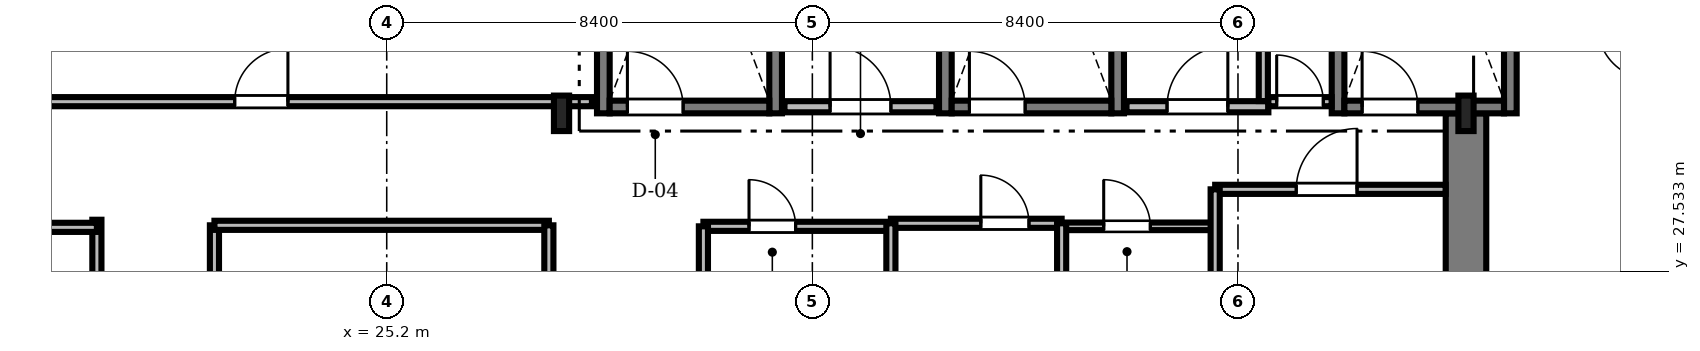
"""IFC4 building model, lengths in metres.
Left out: names, types, materials, properties, quantities, classifications, styles, units other than length and angle.
Written with IfcOpenShell. Run it as: python <this file> out.ifc"""

import sys

from ifc_helpers import new_model, si_unit, direction, frame, frame_2d, origin, origin_2d, place, context, subcontext, project, spatial, rectangle, i_section, extrude, source, transform, mapped, element, fill, save


model = new_model("IFC4")
c1 = context("Model", 3, precision=1e-05, world=origin(), true_north=direction((0.0, 1.0)))
c2 = subcontext(c1, "Body", "Model", "MODEL_VIEW")
j1 = project(units=[si_unit("LENGTHUNIT", "METRE"), si_unit("PLANEANGLEUNIT", "RADIAN")], contexts=[c1])
p1 = place(None, origin())
s1 = spatial("IfcSite", under=j1, at=p1, CompositionType="ELEMENT")
p2 = place(p1, origin())
s2 = spatial("IfcBuilding", under=s1, at=p2, CompositionType="ELEMENT")
p3 = place(p2, frame((0.0, 0.0, 196.05)))
s3 = spatial("IfcBuildingStorey", under=s2, at=p3, CompositionType="ELEMENT", Elevation=196.05)
m1 = source(origin(), c2, "Body", "SweptSolid", [
    extrude(rectangle(XDim=13.15, YDim=0.8, at=frame_2d((6.575, 0.0))), origin(), (0.0, 0.0, 1.0), 3.53),
])
p4 = place(p3, frame((46.5, 17.5, 0.0), z_axis=(0.0, 0.0, 1.0), x_axis=(0.0, 1.0, 0.0)))
e1 = element("IfcWall", 1, at=p4, inside=s3, PredefinedType="SHEAR", context=c2, shape_type="MappedRepresentation", body=[
    mapped(m1, transform((0.0, 0.0, 0.0), scale=1.0)),
])
m2 = source(origin(), c2, "Body", "SweptSolid", [
    extrude(i_section(OverallWidth=0.3, OverallDepth=0.7, WebThickness=0.017, FlangeThickness=0.032, FilletRadius=0.027, at=origin_2d()), origin(), (0.0, 0.0, 1.0), 3.53),
])
for number, where, z_axis, x_axis in (
    (2, (28.65, 30.65, 0.0), (0.0, 0.0, 1.0), (1.0, 0.0, 0.0)),
    (3, (46.5, 30.65, 0.0), (0.0, 0.0, 1.0), (1.0, 0.0, 0.0)),
):
    element("IfcColumn", number, at=place(p3, frame(where, z_axis=z_axis, x_axis=x_axis)), inside=s3, PredefinedType="COLUMN", context=c2, shape_type="MappedRepresentation", body=[
        mapped(m2, transform((0.0, 0.0, 0.0), scale=1.0)),
    ])
m3 = source(origin(), c2, "Body", "SweptSolid", [
    extrude(rectangle(XDim=9.25, YDim=0.25, at=frame_2d((4.625, 0.0))), origin(), (0.0, 0.0, 1.0), 3.55),
])
for number, where, z_axis, x_axis in (
    (4, (29.475, 30.65, 0.0), (0.0, 0.0, 1.0), (0.0, 1.0, 0.0)),
    (5, (32.875, 30.65, 0.0), (0.0, 0.0, 1.0), (0.0, 1.0, 0.0)),
):
    element("IfcWall", number, at=place(p3, frame(where, z_axis=z_axis, x_axis=x_axis)), inside=s3, PredefinedType="SOLIDWALL", context=c2, shape_type="MappedRepresentation", body=[
        mapped(m3, transform((0.0, 0.0, 0.0), scale=1.0)),
    ])
m4 = source(origin(), c2, "Body", "SweptSolid", [
    extrude(rectangle(XDim=3.15, YDim=0.25, at=frame_2d((1.575, 0.0))), origin(), (0.0, 0.0, 1.0), 3.55),
])
p5 = place(p3, frame((29.6, 30.775, 0.0), z_axis=(0.0, 0.0, 1.0), x_axis=(1.0, 0.0, 0.0)))
e6 = element("IfcWall", 6, at=p5, inside=s3, PredefinedType="SOLIDWALL", context=c2, shape_type="MappedRepresentation", body=[
    mapped(m4, transform((0.0, 0.0, 0.0), scale=1.0)),
])
m5 = source(origin(), c2, "Body", "SweptSolid", [
    extrude(rectangle(XDim=1.1, YDim=2.2, at=frame_2d((0.55, 1.1))), frame((0.0, 0.135, 0.0), z_axis=(0.0, -1.0, 0.0), x_axis=(1.0, 0.0, 0.0)), (0.0, 0.0, 1.0), 0.27),
])
p6 = place(p5, frame((0.35, 0.0, 0.0)))
e7 = element("IfcOpeningElement", 7, at=p6, cuts=e6, PredefinedType="OPENING", context=c2, shape_type="MappedRepresentation", body=[
    mapped(m5, transform((0.0, 0.0, 0.0), scale=1.0)),
])
for number, where, z_axis, x_axis in (
    (8, (36.225, 30.65, 0.0), (0.0, 0.0, 1.0), (0.0, 1.0, 0.0)),
    (9, (39.625, 30.65, 0.0), (0.0, 0.0, 1.0), (0.0, 1.0, 0.0)),
):
    element("IfcWall", number, at=place(p3, frame(where, z_axis=z_axis, x_axis=x_axis)), inside=s3, PredefinedType="SOLIDWALL", context=c2, shape_type="MappedRepresentation", body=[
        mapped(m3, transform((0.0, 0.0, 0.0), scale=1.0)),
    ])
p7 = place(p3, frame((36.35, 30.775, 0.0), z_axis=(0.0, 0.0, 1.0), x_axis=(1.0, 0.0, 0.0)))
e10 = element("IfcWall", 10, at=p7, inside=s3, PredefinedType="SOLIDWALL", context=c2, shape_type="MappedRepresentation", body=[
    mapped(m4, transform((0.0, 0.0, 0.0), scale=1.0)),
])
p8 = place(p7, frame((0.35, 0.0, 0.0)))
e11 = element("IfcOpeningElement", 11, at=p8, cuts=e10, PredefinedType="OPENING", context=c2, shape_type="MappedRepresentation", body=[
    mapped(m5, transform((0.0, 0.0, 0.0), scale=1.0)),
])
for number, where, z_axis, x_axis in (
    (12, (43.975, 30.65, 0.0), (0.0, 0.0, 1.0), (0.0, 1.0, 0.0)),
    (13, (47.375, 30.65, 0.0), (0.0, 0.0, 1.0), (0.0, 1.0, 0.0)),
):
    element("IfcWall", number, at=place(p3, frame(where, z_axis=z_axis, x_axis=x_axis)), inside=s3, PredefinedType="SOLIDWALL", context=c2, shape_type="MappedRepresentation", body=[
        mapped(m3, transform((0.0, 0.0, 0.0), scale=1.0)),
    ])
p9 = place(p3, frame((44.1, 30.775, 0.0), z_axis=(0.0, 0.0, 1.0), x_axis=(1.0, 0.0, 0.0)))
e14 = element("IfcWall", 14, at=p9, inside=s3, PredefinedType="SOLIDWALL", context=c2, shape_type="MappedRepresentation", body=[
    mapped(m4, transform((0.0, 0.0, 0.0), scale=1.0)),
])
p10 = place(p9, frame((0.35, 0.0, 0.0)))
e15 = element("IfcOpeningElement", 15, at=p10, cuts=e14, PredefinedType="OPENING", context=c2, shape_type="MappedRepresentation", body=[
    mapped(m5, transform((0.0, 0.0, 0.0), scale=1.0)),
])
m6 = source(origin(), c2, "Body", "SweptSolid", [
    extrude(rectangle(XDim=3.0, YDim=0.22, at=frame_2d((1.5, 0.0))), origin(), (0.0, 0.0, 1.0), 3.53),
])
p11 = place(p3, frame((33.05, 30.78, 0.0), z_axis=(0.0, 0.0, 1.0), x_axis=(1.0, 0.0, 0.0)))
e16 = element("IfcWall", 16, at=p11, inside=s3, PredefinedType="SOLIDWALL", context=c2, shape_type="MappedRepresentation", body=[
    mapped(m6, transform((0.0, 0.0, 0.0), scale=1.0)),
])
m7 = source(origin(), c2, "Body", "SweptSolid", [
    extrude(rectangle(XDim=1.2, YDim=2.2, at=frame_2d((0.6, 1.1))), frame((0.0, 0.12, 0.0), z_axis=(0.0, -1.0, 0.0), x_axis=(1.0, 0.0, 0.0)), (0.0, 0.0, 1.0), 0.24),
])
p12 = place(p11, frame((0.9, 0.0, 0.0)))
e17 = element("IfcOpeningElement", 17, at=p12, cuts=e16, PredefinedType="OPENING", context=c2, shape_type="MappedRepresentation", body=[
    mapped(m7, transform((0.0, 0.0, 0.0), scale=1.0)),
])
m8 = source(origin(), c2, "Body", "SweptSolid", [
    extrude(rectangle(XDim=2.8, YDim=0.22, at=frame_2d((1.4, 0.0))), origin(), (0.0, 0.0, 1.0), 3.53),
])
p13 = place(p3, frame((39.8, 30.78, 0.0), z_axis=(0.0, 0.0, 1.0), x_axis=(1.0, 0.0, 0.0)))
e18 = element("IfcWall", 18, at=p13, inside=s3, PredefinedType="SOLIDWALL", context=c2, shape_type="MappedRepresentation", body=[
    mapped(m8, transform((0.0, 0.0, 0.0), scale=1.0)),
])
p14 = place(p13, frame((0.8, 0.0, 0.0)))
e19 = element("IfcOpeningElement", 19, at=p14, cuts=e18, PredefinedType="OPENING", context=c2, shape_type="MappedRepresentation", body=[
    mapped(m7, transform((0.0, 0.0, 0.0), scale=1.0)),
])
m9 = source(origin(), c2, "Body", "SweptSolid", [
    extrude(rectangle(XDim=17.828, YDim=0.18, at=frame_2d((8.914, 0.0))), origin(), (0.0, 0.0, 1.0), 2.772),
])
p15 = place(p3, frame((11.422, 30.88, 0.0), z_axis=(0.0, 0.0, 1.0), x_axis=(1.0, 0.0, 0.0)))
e20 = element("IfcWall", 20, at=p15, inside=s3, PredefinedType="PARTITIONING", context=c2, shape_type="MappedRepresentation", body=[
    mapped(m9, transform((0.0, 0.0, 0.0), scale=1.0)),
])
m10 = source(origin(), c2, "Body", "SweptSolid", [
    extrude(rectangle(XDim=1.05, YDim=2.2, at=frame_2d((0.525, 1.1))), frame((0.0, 0.1, 0.0), z_axis=(0.0, -1.0, 0.0), x_axis=(1.0, 0.0, 0.0)), (0.0, 0.0, 1.0), 0.2),
])
p16 = place(p15, frame((10.778, 0.0, 0.0)))
e21 = element("IfcOpeningElement", 21, at=p16, cuts=e20, PredefinedType="OPENING", context=c2, shape_type="MappedRepresentation", body=[
    mapped(m10, transform((0.0, 0.0, 0.0), scale=1.0)),
])
m11 = source(origin(), c2, "Body", "SweptSolid", [
    extrude(rectangle(XDim=14.92, YDim=0.18, at=frame_2d((7.46, 0.0))), origin(), (0.0, 0.0, 1.0), 2.972),
])
p17 = place(p3, frame((19.48, 13.63, 0.0), z_axis=(0.0, 0.0, 1.0), x_axis=(0.0, 1.0, 0.0)))
e22 = element("IfcWall", 22, at=p17, inside=s3, PredefinedType="PARTITIONING", context=c2, shape_type="MappedRepresentation", body=[
    mapped(m11, transform((0.0, 0.0, 0.0), scale=1.0)),
])
p18 = place(p17, frame((1.942, 0.0, 0.0)))
e23 = element("IfcOpeningElement", 23, at=p18, cuts=e22, PredefinedType="OPENING", context=c2, shape_type="MappedRepresentation", body=[
    mapped(m10, transform((0.0, 0.0, 0.0), scale=1.0)),
])
m12 = source(origin(), c2, "Body", "SweptSolid", [
    extrude(rectangle(XDim=0.95, YDim=2.15, at=frame_2d((0.475, 1.075))), frame((0.0, 0.1, 0.0), z_axis=(0.0, -1.0, 0.0), x_axis=(1.0, 0.0, 0.0)), (0.0, 0.0, 1.0), 0.2),
])
p19 = place(p17, frame((8.09, 0.0, 0.0)))
e24 = element("IfcOpeningElement", 24, at=p19, cuts=e22, PredefinedType="OPENING", context=c2, shape_type="MappedRepresentation", body=[
    mapped(m12, transform((0.0, 0.0, 0.0), scale=1.0)),
])
p20 = place(p17, frame((11.788, 0.0, 0.0)))
e25 = element("IfcOpeningElement", 25, at=p20, cuts=e22, PredefinedType="OPENING", context=c2, shape_type="MappedRepresentation", body=[
    mapped(m10, transform((0.0, 0.0, 0.0), scale=1.0)),
])
m13 = source(origin(), c2, "Body", "SweptSolid", [
    extrude(rectangle(XDim=4.548, YDim=0.18, at=frame_2d((2.274, 0.0))), origin(), (0.0, 0.0, 1.0), 3.162),
])
p21 = place(p3, frame((41.55, 29.15, 0.0), z_axis=(0.0, 0.0, 1.0), x_axis=(1.0, 0.0, 0.0)))
e26 = element("IfcWall", 26, at=p21, inside=s3, PredefinedType="PARTITIONING", context=c2, shape_type="MappedRepresentation", body=[
    mapped(m13, transform((0.0, 0.0, 0.0), scale=1.0)),
])
m14 = source(origin(), c2, "Body", "SweptSolid", [
    extrude(rectangle(XDim=1.2, YDim=2.2, at=frame_2d((0.6, 1.1))), frame((0.0, 0.1, 0.0), z_axis=(0.0, -1.0, 0.0), x_axis=(1.0, 0.0, 0.0)), (0.0, 0.0, 1.0), 0.2),
])
p22 = place(p21, frame((1.6, 0.0, 0.0)))
e27 = element("IfcOpeningElement", 27, at=p22, cuts=e26, PredefinedType="OPENING", context=c2, shape_type="MappedRepresentation", body=[
    mapped(m14, transform((0.0, 0.0, 0.0), scale=1.0)),
])
m15 = source(origin(), c2, "Body", "SweptSolid", [
    extrude(rectangle(XDim=4.24, YDim=0.18, at=frame_2d((2.12, 0.0))), origin(), (0.0, 0.0, 1.0), 2.972),
])
p23 = place(p3, frame((21.8, 24.2, 0.0), z_axis=(0.0, 0.0, 1.0), x_axis=(0.0, 1.0, 0.0)))
e28 = element("IfcWall", 28, at=p23, inside=s3, PredefinedType="PARTITIONING", context=c2, shape_type="MappedRepresentation", body=[
    mapped(m15, transform((0.0, 0.0, 0.0), scale=1.0)),
])
p24 = place(p23, frame((1.4, 0.0, 0.0)))
e29 = element("IfcOpeningElement", 29, at=p24, cuts=e28, PredefinedType="OPENING", context=c2, shape_type="MappedRepresentation", body=[
    mapped(m10, transform((0.0, 0.0, 0.0), scale=1.0)),
])
m16 = source(origin(), c2, "Body", "SweptSolid", [
    extrude(rectangle(XDim=3.7, YDim=0.18, at=frame_2d((1.85, 0.0))), origin(), (0.0, 0.0, 1.0), 3.162),
])
p25 = place(p3, frame((31.45, 28.42, 0.0), z_axis=(0.0, 0.0, 1.0), x_axis=(1.0, 0.0, 0.0)))
e30 = element("IfcWall", 30, at=p25, inside=s3, PredefinedType="PARTITIONING", context=c2, shape_type="MappedRepresentation", body=[
    mapped(m16, transform((0.0, 0.0, 0.0), scale=1.0)),
])
m17 = source(origin(), c2, "Body", "SweptSolid", [
    extrude(rectangle(XDim=0.92, YDim=2.1, at=frame_2d((0.46, 1.05))), frame((0.0, 0.1, 0.0), z_axis=(0.0, -1.0, 0.0), x_axis=(1.0, 0.0, 0.0)), (0.0, 0.0, 1.0), 0.2),
])
p26 = place(p25, frame((0.9, 0.0, 0.0)))
e31 = element("IfcOpeningElement", 31, at=p26, cuts=e30, PredefinedType="OPENING", context=c2, shape_type="MappedRepresentation", body=[
    mapped(m17, transform((0.0, 0.0, 0.0), scale=1.0)),
])
m18 = source(origin(), c2, "Body", "SweptSolid", [
    extrude(rectangle(XDim=3.37, YDim=0.18, at=frame_2d((1.685, 0.0))), origin(), (0.0, 0.0, 1.0), 3.53),
])
p27 = place(p3, frame((35.15, 28.48, 0.0), z_axis=(0.0, 0.0, 1.0), x_axis=(1.0, 0.0, 0.0)))
e32 = element("IfcWall", 32, at=p27, inside=s3, PredefinedType="PARTITIONING", context=c2, shape_type="MappedRepresentation", body=[
    mapped(m18, transform((0.0, 0.0, 0.0), scale=1.0)),
])
p28 = place(p27, frame((1.775, 0.0, 0.0)))
e33 = element("IfcOpeningElement", 33, at=p28, cuts=e32, PredefinedType="OPENING", context=c2, shape_type="MappedRepresentation", body=[
    mapped(m12, transform((0.0, 0.0, 0.0), scale=1.0)),
])
m19 = source(origin(), c2, "Body", "SweptSolid", [
    extrude(rectangle(XDim=3.0, YDim=0.15, at=frame_2d((1.5, 0.0))), origin(), (0.0, 0.0, 1.0), 3.53),
])
p29 = place(p3, frame((38.52, 28.42, 0.0), z_axis=(0.0, 0.0, 1.0), x_axis=(1.0, 0.0, 0.0)))
e34 = element("IfcWall", 34, at=p29, inside=s3, PredefinedType="PARTITIONING", context=c2, shape_type="MappedRepresentation", body=[
    mapped(m19, transform((0.0, 0.0, 0.0), scale=1.0)),
])
m20 = source(origin(), c2, "Body", "SweptSolid", [
    extrude(rectangle(XDim=0.92, YDim=2.1, at=frame_2d((0.46, 1.05))), frame((0.0, 0.085, 0.0), z_axis=(0.0, -1.0, 0.0), x_axis=(1.0, 0.0, 0.0)), (0.0, 0.0, 1.0), 0.17),
])
p30 = place(p29, frame((0.83, 0.0, 0.0)))
e35 = element("IfcOpeningElement", 35, at=p30, cuts=e34, PredefinedType="OPENING", context=c2, shape_type="MappedRepresentation", body=[
    mapped(m20, transform((0.0, 0.0, 0.0), scale=1.0)),
])
m21 = source(origin(), c2, "Body", "SweptSolid", [
    extrude(rectangle(XDim=1.248, YDim=0.18, at=frame_2d((0.624, 0.0))), origin(), (0.0, 0.0, 1.0), 3.53),
])
p31 = place(p3, frame((42.6, 30.88, 0.0), z_axis=(0.0, 0.0, 1.0), x_axis=(1.0, 0.0, 0.0)))
e36 = element("IfcWall", 36, at=p31, inside=s3, PredefinedType="PARTITIONING", context=c2, shape_type="MappedRepresentation", body=[
    mapped(m21, transform((0.0, 0.0, 0.0), scale=1.0)),
])
p32 = place(p31, frame((0.164, 0.0, 0.0)))
e37 = element("IfcOpeningElement", 37, at=p32, cuts=e36, PredefinedType="OPENING", context=c2, shape_type="MappedRepresentation", body=[
    mapped(m17, transform((0.0, 0.0, 0.0), scale=1.0)),
])
m22 = source(origin(), c2, "Body", "SweptSolid", [
    extrude(rectangle(XDim=8.25, YDim=0.18, at=frame_2d((4.125, 0.0))), origin(), (0.0, 0.0, 1.0), 2.772),
])
p33 = place(p3, frame((11.23, 28.4, 0.0), z_axis=(0.0, 0.0, 1.0), x_axis=(1.0, 0.0, 0.0)))
e38 = element("IfcWall", 38, at=p33, inside=s3, PredefinedType="PARTITIONING", context=c2, shape_type="MappedRepresentation", body=[
    mapped(m22, transform((0.0, 0.0, 0.0), scale=1.0)),
])
m23 = source(origin(), c2, "Body", "SweptSolid", [
    extrude(rectangle(XDim=6.6, YDim=0.18, at=frame_2d((3.3, 0.0))), origin(), (0.0, 0.0, 1.0), 3.53),
])
p34 = place(p3, frame((21.8, 28.44, 0.0), z_axis=(0.0, 0.0, 1.0), x_axis=(1.0, 0.0, 0.0)))
e39 = element("IfcWall", 39, at=p34, inside=s3, PredefinedType="PARTITIONING", context=c2, shape_type="MappedRepresentation", body=[
    mapped(m23, transform((0.0, 0.0, 0.0), scale=1.0)),
])
p35 = place(p3, frame((28.4, 24.2, 0.0), z_axis=(0.0, 0.0, 1.0), x_axis=(0.0, 1.0, 0.0)))
e40 = element("IfcWall", 40, at=p35, inside=s3, PredefinedType="PARTITIONING", context=c2, shape_type="MappedRepresentation", body=[
    mapped(m15, transform((0.0, 0.0, 0.0), scale=1.0)),
])
m24 = source(origin(), c2, "Body", "SweptSolid", [
    extrude(rectangle(XDim=2.35, YDim=0.18, at=frame_2d((1.175, 0.0))), origin(), (0.0, 0.0, 1.0), 2.972),
])
p36 = place(p3, frame((41.55, 26.8, 0.0), z_axis=(0.0, 0.0, 1.0), x_axis=(0.0, 1.0, 0.0)))
e41 = element("IfcWall", 41, at=p36, inside=s3, PredefinedType="PARTITIONING", context=c2, shape_type="MappedRepresentation", body=[
    mapped(m24, transform((0.0, 0.0, 0.0), scale=1.0)),
])
m25 = source(origin(), c2, "Body", "SweptSolid", [
    extrude(rectangle(XDim=1.858, YDim=0.18, at=frame_2d((0.929, 0.0))), origin(), (0.0, 0.0, 1.0), 3.53),
])
p37 = place(p3, frame((42.5, 30.892, 0.0), z_axis=(0.0, 0.0, 1.0), x_axis=(0.0, 1.0, 0.0)))
e42 = element("IfcWall", 42, at=p37, inside=s3, PredefinedType="PARTITIONING", context=c2, shape_type="MappedRepresentation", body=[
    mapped(m25, transform((0.0, 0.0, 0.0), scale=1.0)),
])
m26 = source(origin(), c2, "Body", "SweptSolid", [
    extrude(rectangle(XDim=1.66, YDim=0.18, at=frame_2d((0.83, 0.0))), origin(), (0.0, 0.0, 1.0), 3.072),
])
for number, where, z_axis, x_axis in (
    (43, (35.15, 26.82, 0.0), (0.0, 0.0, 1.0), (0.0, 1.0, 0.0)),
    (44, (38.52, 26.82, 0.0), (0.0, 0.0, 1.0), (0.0, 1.0, 0.0)),
):
    element("IfcWall", number, at=place(p3, frame(where, z_axis=z_axis, x_axis=x_axis)), inside=s3, PredefinedType="PARTITIONING", context=c2, shape_type="MappedRepresentation", body=[
        mapped(m26, transform((0.0, 0.0, 0.0), scale=1.0)),
    ])
m27 = source(origin(), c2, "Body", "SweptSolid", [
    extrude(rectangle(XDim=1.6, YDim=0.18, at=frame_2d((0.8, 0.0))), origin(), (0.0, 0.0, 1.0), 3.072),
])
p38 = place(p3, frame((31.45, 26.82, 0.0), z_axis=(0.0, 0.0, 1.0), x_axis=(0.0, 1.0, 0.0)))
e45 = element("IfcWall", 45, at=p38, inside=s3, PredefinedType="PARTITIONING", context=c2, shape_type="MappedRepresentation", body=[
    mapped(m27, transform((0.0, 0.0, 0.0), scale=1.0)),
])
m28 = source(origin(), c2, "Body", "SweptSolid", [
    extrude(rectangle(XDim=1.1, YDim=2.2, at=frame_2d((0.55, 1.1))), frame((0.0, 0.025, 0.0), z_axis=(0.0, -1.0, 0.0), x_axis=(1.0, 0.0, 0.0)), (0.0, 0.0, 1.0), 0.05),
])
p39 = place(p6, origin())
e46 = element("IfcDoor", 46, at=p39, inside=s3, OperationType="SINGLE_SWING_LEFT", PredefinedType="DOOR", context=c2, shape_type="MappedRepresentation", body=[
    mapped(m28, transform((0.0, 0.0, 0.0), scale=1.0)),
])
fill(e7, e46)
p40 = place(p8, origin())
e47 = element("IfcDoor", 47, at=p40, inside=s3, OperationType="SINGLE_SWING_LEFT", PredefinedType="DOOR", context=c2, shape_type="MappedRepresentation", body=[
    mapped(m28, transform((0.0, 0.0, 0.0), scale=1.0)),
])
fill(e11, e47)
p41 = place(p10, origin())
e48 = element("IfcDoor", 48, at=p41, inside=s3, OperationType="SINGLE_SWING_LEFT", PredefinedType="DOOR", context=c2, shape_type="MappedRepresentation", body=[
    mapped(m28, transform((0.0, 0.0, 0.0), scale=1.0)),
])
fill(e15, e48)
m29 = source(origin(), c2, "Body", "SweptSolid", [
    extrude(rectangle(XDim=1.2, YDim=2.2, at=frame_2d((0.6, 1.1))), frame((0.0, 0.025, 0.0), z_axis=(0.0, -1.0, 0.0), x_axis=(1.0, 0.0, 0.0)), (0.0, 0.0, 1.0), 0.05),
])
p42 = place(p12, origin())
e49 = element("IfcDoor", 49, at=p42, inside=s3, OperationType="SINGLE_SWING_LEFT", PredefinedType="DOOR", context=c2, shape_type="MappedRepresentation", body=[
    mapped(m29, transform((0.0, 0.0, 0.0), scale=1.0)),
])
fill(e17, e49)
p43 = place(p14, origin())
e50 = element("IfcDoor", 50, at=p43, inside=s3, OperationType="SINGLE_SWING_RIGHT", PredefinedType="DOOR", context=c2, shape_type="MappedRepresentation", body=[
    mapped(m29, transform((0.0, 0.0, 0.0), scale=1.0)),
])
fill(e19, e50)
m30 = source(origin(), c2, "Body", "SweptSolid", [
    extrude(rectangle(XDim=1.05, YDim=2.2, at=frame_2d((0.525, 1.1))), frame((0.0, 0.025, 0.0), z_axis=(0.0, -1.0, 0.0), x_axis=(1.0, 0.0, 0.0)), (0.0, 0.0, 1.0), 0.05),
])
p44 = place(p16, origin())
e51 = element("IfcDoor", 51, at=p44, inside=s3, OperationType="SINGLE_SWING_RIGHT", PredefinedType="DOOR", context=c2, shape_type="MappedRepresentation", body=[
    mapped(m30, transform((0.0, 0.0, 0.0), scale=1.0)),
])
fill(e21, e51)
p45 = place(p22, origin())
e52 = element("IfcDoor", 52, at=p45, inside=s3, OperationType="SINGLE_SWING_RIGHT", PredefinedType="DOOR", context=c2, shape_type="MappedRepresentation", body=[
    mapped(m29, transform((0.0, 0.0, 0.0), scale=1.0)),
])
fill(e27, e52)
m31 = source(origin(), c2, "Body", "SweptSolid", [
    extrude(rectangle(XDim=0.92, YDim=2.1, at=frame_2d((0.46, 1.05))), frame((0.0, 0.025, 0.0), z_axis=(0.0, -1.0, 0.0), x_axis=(1.0, 0.0, 0.0)), (0.0, 0.0, 1.0), 0.05),
])
p46 = place(p26, origin())
e53 = element("IfcDoor", 53, at=p46, inside=s3, OperationType="SINGLE_SWING_LEFT", PredefinedType="DOOR", context=c2, shape_type="MappedRepresentation", body=[
    mapped(m31, transform((0.0, 0.0, 0.0), scale=1.0)),
])
fill(e31, e53)
m32 = source(origin(), c2, "Body", "SweptSolid", [
    extrude(rectangle(XDim=0.95, YDim=2.15, at=frame_2d((0.475, 1.075))), frame((0.0, 0.025, 0.0), z_axis=(0.0, -1.0, 0.0), x_axis=(1.0, 0.0, 0.0)), (0.0, 0.0, 1.0), 0.05),
])
p47 = place(p28, origin())
e54 = element("IfcDoor", 54, at=p47, inside=s3, OperationType="SINGLE_SWING_LEFT", PredefinedType="DOOR", context=c2, shape_type="MappedRepresentation", body=[
    mapped(m32, transform((0.0, 0.0, 0.0), scale=1.0)),
])
fill(e33, e54)
p48 = place(p30, origin())
e55 = element("IfcDoor", 55, at=p48, inside=s3, OperationType="SINGLE_SWING_LEFT", PredefinedType="DOOR", context=c2, shape_type="MappedRepresentation", body=[
    mapped(m31, transform((0.0, 0.0, 0.0), scale=1.0)),
])
fill(e35, e55)
p49 = place(p32, origin())
e56 = element("IfcDoor", 56, at=p49, inside=s3, OperationType="SINGLE_SWING_LEFT", PredefinedType="DOOR", context=c2, shape_type="MappedRepresentation", body=[
    mapped(m31, transform((0.0, 0.0, 0.0), scale=1.0)),
])
fill(e37, e56)
save(model, sys.argv[1])
